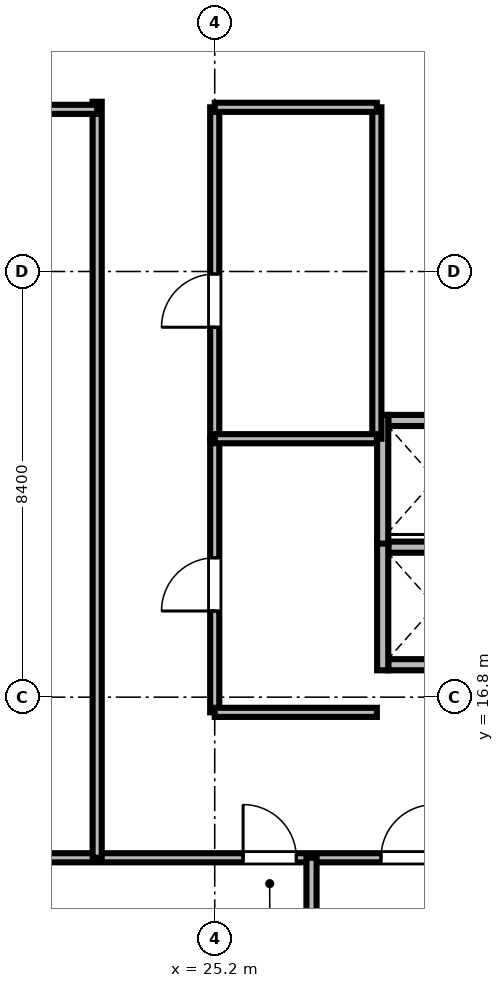
"""IFC4 building model, lengths in metres.
Left out: names, types, materials, properties, quantities, classifications, styles, units other than length and angle.
Written with IfcOpenShell. Run it as: python <this file> out.ifc"""

import sys

from ifc_helpers import new_model, si_unit, direction, frame, frame_2d, origin, place, context, subcontext, project, spatial, rectangle, extrude, source, transform, mapped, element, fill, save


model = new_model("IFC4")
c1 = context("Model", 3, precision=1e-05, world=origin(), true_north=direction((0.0, 1.0)))
c2 = subcontext(c1, "Body", "Model", "MODEL_VIEW")
j1 = project(units=[si_unit("LENGTHUNIT", "METRE"), si_unit("PLANEANGLEUNIT", "RADIAN")], contexts=[c1])
p1 = place(None, origin())
s1 = spatial("IfcSite", under=j1, at=p1, CompositionType="ELEMENT")
p2 = place(p1, origin())
s2 = spatial("IfcBuilding", under=s1, at=p2, CompositionType="ELEMENT")
p3 = place(p2, frame((0.0, 0.0, 226.05)))
s3 = spatial("IfcBuildingStorey", under=s2, at=p3, CompositionType="ELEMENT", Elevation=226.05)
m1 = source(origin(), c2, "Body", "SweptSolid", [
    extrude(rectangle(XDim=1.85, YDim=0.22, at=frame_2d((0.925, 0.0))), origin(), (0.0, 0.0, 1.0), 2.972),
])
p4 = place(p3, frame((28.625, 17.44, 0.0), z_axis=(0.0, 0.0, 1.0), x_axis=(1.0, 0.0, 0.0)))
e1 = element("IfcWall", 1, at=p4, inside=s3, PredefinedType="SOLIDWALL", context=c2, shape_type="MappedRepresentation", body=[
    mapped(m1, transform((0.0, 0.0, 0.0), scale=1.0)),
])
m2 = source(origin(), c2, "Body", "SweptSolid", [
    extrude(rectangle(XDim=1.85, YDim=0.22, at=frame_2d((0.925, 0.0))), origin(), (0.0, 0.0, 1.0), 3.53),
])
p5 = place(p3, frame((28.625, 19.76, 0.0), z_axis=(0.0, 0.0, 1.0), x_axis=(1.0, 0.0, 0.0)))
e2 = element("IfcWall", 2, at=p5, inside=s3, PredefinedType="SOLIDWALL", context=c2, shape_type="MappedRepresentation", body=[
    mapped(m2, transform((0.0, 0.0, 0.0), scale=1.0)),
])
m3 = source(origin(), c2, "Body", "SweptSolid", [
    extrude(rectangle(XDim=2.54, YDim=0.22, at=frame_2d((1.27, 0.0))), origin(), (0.0, 0.0, 1.0), 2.972),
])
p6 = place(p3, frame((28.515, 17.33, 0.0), z_axis=(0.0, 0.0, 1.0), x_axis=(0.0, 1.0, 0.0)))
e3 = element("IfcWall", 3, at=p6, inside=s3, PredefinedType="SOLIDWALL", context=c2, shape_type="MappedRepresentation", body=[
    mapped(m3, transform((0.0, 0.0, 0.0), scale=1.0)),
])
p7 = place(p3, frame((28.625, 22.26, 0.0), z_axis=(0.0, 0.0, 1.0), x_axis=(1.0, 0.0, 0.0)))
e4 = element("IfcWall", 4, at=p7, inside=s3, PredefinedType="SOLIDWALL", context=c2, shape_type="MappedRepresentation", body=[
    mapped(m2, transform((0.0, 0.0, 0.0), scale=1.0)),
])
m4 = source(origin(), c2, "Body", "SweptSolid", [
    extrude(rectangle(XDim=2.54, YDim=0.22, at=frame_2d((1.27, 0.0))), origin(), (0.0, 0.0, 1.0), 3.53),
])
p8 = place(p3, frame((28.515, 19.83, 0.0), z_axis=(0.0, 0.0, 1.0), x_axis=(0.0, 1.0, 0.0)))
e5 = element("IfcWall", 5, at=p8, inside=s3, PredefinedType="SOLIDWALL", context=c2, shape_type="MappedRepresentation", body=[
    mapped(m4, transform((0.0, 0.0, 0.0), scale=1.0)),
])
m5 = source(origin(), c2, "Body", "SweptSolid", [
    extrude(rectangle(XDim=46.156, YDim=0.18, at=frame_2d((23.078, 0.0))), origin(), (0.0, 0.0, 1.0), 2.772),
])
p9 = place(p3, frame((11.422, 13.63, 0.0), z_axis=(0.0, 0.0, 1.0), x_axis=(1.0, 0.0, 0.0)))
e6 = element("IfcWall", 6, at=p9, inside=s3, PredefinedType="PARTITIONING", context=c2, shape_type="MappedRepresentation", body=[
    mapped(m5, transform((0.0, 0.0, 0.0), scale=1.0)),
])
m6 = source(origin(), c2, "Body", "SweptSolid", [
    extrude(rectangle(XDim=1.05, YDim=2.2, at=frame_2d((0.525, 1.1))), frame((0.0, 0.1, 0.0), z_axis=(0.0, -1.0, 0.0), x_axis=(1.0, 0.0, 0.0)), (0.0, 0.0, 1.0), 0.2),
])
p10 = place(p9, frame((14.338, 0.0, 0.0)))
e7 = element("IfcOpeningElement", 7, at=p10, cuts=e6, PredefinedType="OPENING", context=c2, shape_type="MappedRepresentation", body=[
    mapped(m6, transform((0.0, 0.0, 0.0), scale=1.0)),
])
p11 = place(p9, frame((17.059, 0.0, 0.0)))
e8 = element("IfcOpeningElement", 8, at=p11, cuts=e6, PredefinedType="OPENING", context=c2, shape_type="MappedRepresentation", body=[
    mapped(m6, transform((0.0, 0.0, 0.0), scale=1.0)),
])
p12 = place(p9, frame((21.772, 0.0, 0.0)))
e9 = element("IfcOpeningElement", 9, at=p12, cuts=e6, PredefinedType="OPENING", context=c2, shape_type="MappedRepresentation", body=[
    mapped(m6, transform((0.0, 0.0, 0.0), scale=1.0)),
])
p13 = place(p9, frame((27.414, 0.0, 0.0)))
e10 = element("IfcOpeningElement", 10, at=p13, cuts=e6, PredefinedType="OPENING", context=c2, shape_type="MappedRepresentation", body=[
    mapped(m6, transform((0.0, 0.0, 0.0), scale=1.0)),
])
p14 = place(p9, frame((33.057, 0.0, 0.0)))
e11 = element("IfcOpeningElement", 11, at=p14, cuts=e6, PredefinedType="OPENING", context=c2, shape_type="MappedRepresentation", body=[
    mapped(m6, transform((0.0, 0.0, 0.0), scale=1.0)),
])
p15 = place(p9, frame((37.498, 0.0, 0.0)))
e12 = element("IfcOpeningElement", 12, at=p15, cuts=e6, PredefinedType="OPENING", context=c2, shape_type="MappedRepresentation", body=[
    mapped(m6, transform((0.0, 0.0, 0.0), scale=1.0)),
])
m7 = source(origin(), c2, "Body", "SweptSolid", [
    extrude(rectangle(XDim=6.54, YDim=0.18, at=frame_2d((3.27, 0.0))), origin(), (0.0, 0.0, 1.0), 2.972),
])
p16 = place(p3, frame((25.2, 21.9, 0.0), z_axis=(0.0, 0.0, 1.0), x_axis=(0.0, 1.0, 0.0)))
e13 = element("IfcWall", 13, at=p16, inside=s3, PredefinedType="PARTITIONING", context=c2, shape_type="MappedRepresentation", body=[
    mapped(m7, transform((0.0, 0.0, 0.0), scale=1.0)),
])
p17 = place(p16, frame((2.2, 0.0, 0.0)))
e14 = element("IfcOpeningElement", 14, at=p17, cuts=e13, PredefinedType="OPENING", context=c2, shape_type="MappedRepresentation", body=[
    mapped(m6, transform((0.0, 0.0, 0.0), scale=1.0)),
])
m8 = source(origin(), c2, "Body", "SweptSolid", [
    extrude(rectangle(XDim=5.4, YDim=0.18, at=frame_2d((2.7, 0.0))), origin(), (0.0, 0.0, 1.0), 2.972),
])
p18 = place(p3, frame((25.2, 16.5, 0.0), z_axis=(0.0, 0.0, 1.0), x_axis=(0.0, 1.0, 0.0)))
e15 = element("IfcWall", 15, at=p18, inside=s3, PredefinedType="PARTITIONING", context=c2, shape_type="MappedRepresentation", body=[
    mapped(m8, transform((0.0, 0.0, 0.0), scale=1.0)),
])
p19 = place(p18, frame((2.0, 0.0, 0.0)))
e16 = element("IfcOpeningElement", 16, at=p19, cuts=e15, PredefinedType="OPENING", context=c2, shape_type="MappedRepresentation", body=[
    mapped(m6, transform((0.0, 0.0, 0.0), scale=1.0)),
])
m9 = source(origin(), c2, "Body", "SweptSolid", [
    extrude(rectangle(XDim=14.92, YDim=0.18, at=frame_2d((7.46, 0.0))), origin(), (0.0, 0.0, 1.0), 2.972),
])
p20 = place(p3, frame((22.88, 13.63, 0.0), z_axis=(0.0, 0.0, 1.0), x_axis=(0.0, 1.0, 0.0)))
e17 = element("IfcWall", 17, at=p20, inside=s3, PredefinedType="PARTITIONING", context=c2, shape_type="MappedRepresentation", body=[
    mapped(m9, transform((0.0, 0.0, 0.0), scale=1.0)),
])
m10 = source(origin(), c2, "Body", "SweptSolid", [
    extrude(rectangle(XDim=11.508, YDim=0.2, at=frame_2d((5.754, 0.0))), origin(), (0.0, 0.0, 1.0), 2.772),
])
p21 = place(p3, frame((27.11, 2.122, 0.0), z_axis=(0.0, 0.0, 1.0), x_axis=(0.0, 1.0, 0.0)))
e18 = element("IfcWall", 18, at=p21, inside=s3, PredefinedType="PARTITIONING", context=c2, shape_type="MappedRepresentation", body=[
    mapped(m10, transform((0.0, 0.0, 0.0), scale=1.0)),
])
m11 = source(origin(), c2, "Body", "SweptSolid", [
    extrude(rectangle(XDim=11.65, YDim=0.18, at=frame_2d((5.825, 0.0))), origin(), (0.0, 0.0, 1.0), 2.772),
])
p22 = place(p3, frame((11.23, 28.4, 0.0), z_axis=(0.0, 0.0, 1.0), x_axis=(1.0, 0.0, 0.0)))
e19 = element("IfcWall", 19, at=p22, inside=s3, PredefinedType="PARTITIONING", context=c2, shape_type="MappedRepresentation", body=[
    mapped(m11, transform((0.0, 0.0, 0.0), scale=1.0)),
])
p23 = place(p3, frame((28.4, 21.9, 0.0), z_axis=(0.0, 0.0, 1.0), x_axis=(0.0, 1.0, 0.0)))
e20 = element("IfcWall", 20, at=p23, inside=s3, PredefinedType="PARTITIONING", context=c2, shape_type="MappedRepresentation", body=[
    mapped(m7, transform((0.0, 0.0, 0.0), scale=1.0)),
])
m12 = source(origin(), c2, "Body", "SweptSolid", [
    extrude(rectangle(XDim=3.2, YDim=0.18, at=frame_2d((1.6, 0.0))), origin(), (0.0, 0.0, 1.0), 3.53),
])
for number, where, z_axis, x_axis in (
    (21, (25.2, 16.5, 0.0), (0.0, 0.0, 1.0), (1.0, 0.0, 0.0)),
    (22, (25.2, 21.9, 0.0), (0.0, 0.0, 1.0), (1.0, 0.0, 0.0)),
    (23, (25.2, 28.44, 0.0), (0.0, 0.0, 1.0), (1.0, 0.0, 0.0)),
):
    element("IfcWall", number, at=place(p3, frame(where, z_axis=z_axis, x_axis=x_axis)), inside=s3, PredefinedType="PARTITIONING", context=c2, shape_type="MappedRepresentation", body=[
        mapped(m12, transform((0.0, 0.0, 0.0), scale=1.0)),
    ])
m13 = source(origin(), c2, "Body", "SweptSolid", [
    extrude(rectangle(XDim=1.05, YDim=2.2, at=frame_2d((0.525, 1.1))), frame((0.0, 0.025, 0.0), z_axis=(0.0, -1.0, 0.0), x_axis=(1.0, 0.0, 0.0)), (0.0, 0.0, 1.0), 0.05),
])
p24 = place(p10, origin())
e24 = element("IfcDoor", 24, at=p24, inside=s3, OperationType="SINGLE_SWING_LEFT", PredefinedType="DOOR", context=c2, shape_type="MappedRepresentation", body=[
    mapped(m13, transform((0.0, 0.0, 0.0), scale=1.0)),
])
fill(e7, e24)
p25 = place(p11, origin())
e25 = element("IfcDoor", 25, at=p25, inside=s3, OperationType="SINGLE_SWING_RIGHT", PredefinedType="DOOR", context=c2, shape_type="MappedRepresentation", body=[
    mapped(m13, transform((0.0, 0.0, 0.0), scale=1.0)),
])
fill(e8, e25)
p26 = place(p17, origin())
e26 = element("IfcDoor", 26, at=p26, inside=s3, OperationType="SINGLE_SWING_LEFT", PredefinedType="DOOR", context=c2, shape_type="MappedRepresentation", body=[
    mapped(m13, transform((0.0, 0.0, 0.0), scale=1.0)),
])
fill(e14, e26)
p27 = place(p19, origin())
e27 = element("IfcDoor", 27, at=p27, inside=s3, OperationType="SINGLE_SWING_LEFT", PredefinedType="DOOR", context=c2, shape_type="MappedRepresentation", body=[
    mapped(m13, transform((0.0, 0.0, 0.0), scale=1.0)),
])
fill(e16, e27)
save(model, sys.argv[1])
